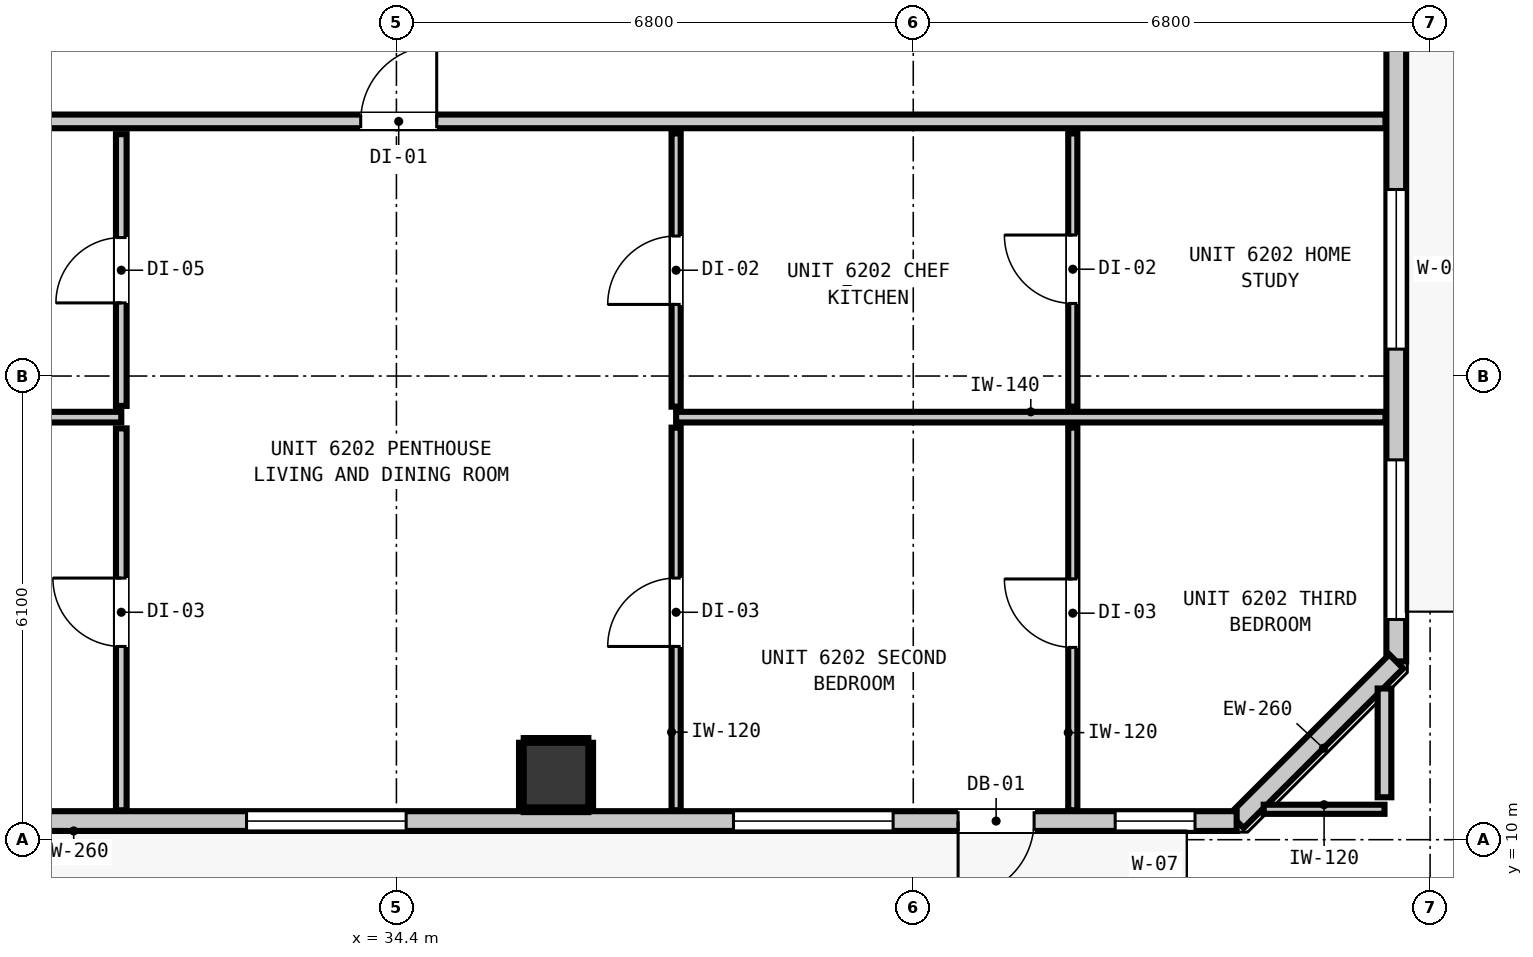
"""IFC4 building model, lengths in metres.
Left out: names, types, materials, properties, quantities, classifications, styles, units other than length and angle.
Written with IfcOpenShell. Run it as: python <this file> out.ifc"""

import sys

from ifc_helpers import new_model, si_unit, direction, frame, frame_2d, origin, origin_2d, place, context, subcontext, project, spatial, rectangle, extrude, element, fill, save


model = new_model("IFC4")
c1 = context("Model", 3, precision=1e-05, world=origin(), true_north=direction((0.0, 1.0)))
c2 = subcontext(c1, "Body", "Model", "MODEL_VIEW")
j1 = project(units=[si_unit("LENGTHUNIT", "METRE"), si_unit("PLANEANGLEUNIT", "RADIAN")], contexts=[c1])
p1 = place(None, origin())
s1 = spatial("IfcSite", under=j1, at=p1, CompositionType="ELEMENT")
p2 = place(p1, origin())
s2 = spatial("IfcBuilding", under=s1, at=p2, CompositionType="ELEMENT")
p3 = place(p2, frame((0.0, 0.0, 213.4)))
s3 = spatial("IfcBuildingStorey", under=s2, at=p3, CompositionType="ELEMENT", Elevation=213.4)
p4 = place(p3, frame((36.5, 10.85, 0.0), z_axis=(0.0, 0.0, 1.0), x_axis=(1.0, 0.0, 0.0)))
e1 = element("IfcColumn", 1, at=p4, inside=s3, PredefinedType="COLUMN", context=c2, shape_type="SweptSolid", body=[
    extrude(rectangle(XDim=0.85, YDim=0.85, at=origin_2d()), origin(), (0.0, 0.0, 1.0), 3.32),
])
p5 = place(p3, frame((47.555, 42.655, 0.0), z_axis=(0.0, 0.0, 1.0), x_axis=(0.0, -1.0, 0.0)))
e2 = element("IfcWall", 2, at=p5, inside=s3, PredefinedType="STANDARD", context=c2, shape_type="SweptSolid", body=[
    extrude(rectangle(XDim=30.31, YDim=0.26, at=frame_2d((15.155, 0.0))), origin(), (0.0, 0.0, 1.0), 3.1),
])
p6 = place(p5, frame((4.082, 0.0, 0.0)))
e3 = element("IfcOpeningElement", 3, at=p6, cuts=e2, PredefinedType="OPENING", context=c2, shape_type="SweptSolid", body=[
    extrude(rectangle(XDim=1.0, YDim=2.15, at=frame_2d((0.5, 1.075))), frame((0.0, 0.14, 0.0), z_axis=(0.0, -1.0, 0.0), x_axis=(1.0, 0.0, 0.0)), (0.0, 0.0, 1.0), 0.28),
])
p7 = place(p5, frame((24.101, 0.0, 0.85)))
e4 = element("IfcOpeningElement", 4, at=p7, cuts=e2, PredefinedType="OPENING", context=c2, shape_type="SweptSolid", body=[
    extrude(rectangle(XDim=2.1, YDim=1.9, at=frame_2d((1.05, 0.95))), frame((0.0, 0.14, 0.0), z_axis=(0.0, -1.0, 0.0), x_axis=(1.0, 0.0, 0.0)), (0.0, 0.0, 1.0), 0.28),
])
p8 = place(p5, frame((27.658, 0.0, 0.85)))
e5 = element("IfcOpeningElement", 5, at=p8, cuts=e2, PredefinedType="OPENING", context=c2, shape_type="SweptSolid", body=[
    extrude(rectangle(XDim=2.1, YDim=1.9, at=frame_2d((1.05, 0.95))), frame((0.0, 0.14, 0.0), z_axis=(0.0, -1.0, 0.0), x_axis=(1.0, 0.0, 0.0)), (0.0, 0.0, 1.0), 0.28),
])
p9 = place(p5, frame((15.255, 0.0, 0.85)))
e6 = element("IfcOpeningElement", 6, at=p9, cuts=e2, PredefinedType="OPENING", context=c2, shape_type="SweptSolid", body=[
    extrude(rectangle(XDim=2.1, YDim=1.9, at=frame_2d((1.05, 0.95))), frame((0.0, 0.14, 0.0), z_axis=(0.0, -1.0, 0.0), x_axis=(1.0, 0.0, 0.0)), (0.0, 0.0, 1.0), 0.28),
])
p10 = place(p3, frame((47.555, 12.345, 0.0), z_axis=(0.0, 0.0, 1.0), x_axis=(-0.707106781187, -0.707106781187, 0.0)))
e7 = element("IfcWall", 7, at=p10, inside=s3, PredefinedType="STANDARD", context=c2, shape_type="SweptSolid", body=[
    extrude(rectangle(XDim=2.97, YDim=0.26, at=frame_2d((1.485, 0.0))), origin(), (0.0, 0.0, 1.0), 3.1),
])
p11 = place(p3, frame((45.455, 10.245, 0.0), z_axis=(0.0, 0.0, 1.0), x_axis=(-1.0, 0.0, 0.0)))
e8 = element("IfcWall", 8, at=p11, inside=s3, PredefinedType="STANDARD", context=c2, shape_type="SweptSolid", body=[
    extrude(rectangle(XDim=32.71, YDim=0.26, at=frame_2d((16.355, 0.0))), origin(), (0.0, 0.0, 1.0), 3.1),
])
p12 = place(p11, frame((2.665, 0.0, 0.0)))
e9 = element("IfcOpeningElement", 9, at=p12, cuts=e8, PredefinedType="OPENING", context=c2, shape_type="SweptSolid", body=[
    extrude(rectangle(XDim=1.0, YDim=2.15, at=frame_2d((0.5, 1.075))), frame((0.0, 0.14, 0.0), z_axis=(0.0, -1.0, 0.0), x_axis=(1.0, 0.0, 0.0)), (0.0, 0.0, 1.0), 0.28),
])
p13 = place(p11, frame((27.297, 0.0, 0.85)))
e10 = element("IfcOpeningElement", 10, at=p13, cuts=e8, PredefinedType="OPENING", context=c2, shape_type="SweptSolid", body=[
    extrude(rectangle(XDim=2.1, YDim=1.9, at=frame_2d((1.05, 0.95))), frame((0.0, 0.14, 0.0), z_axis=(0.0, -1.0, 0.0), x_axis=(1.0, 0.0, 0.0)), (0.0, 0.0, 1.0), 0.28),
])
p14 = place(p11, frame((30.805, 0.0, 0.85)))
e11 = element("IfcOpeningElement", 11, at=p14, cuts=e8, PredefinedType="OPENING", context=c2, shape_type="SweptSolid", body=[
    extrude(rectangle(XDim=0.58, YDim=1.5, at=frame_2d((0.29, 0.75))), frame((0.0, 0.14, 0.0), z_axis=(0.0, -1.0, 0.0), x_axis=(1.0, 0.0, 0.0)), (0.0, 0.0, 1.0), 0.28),
])
p15 = place(p11, frame((21.45, 0.0, 0.85)))
e12 = element("IfcOpeningElement", 12, at=p15, cuts=e8, PredefinedType="OPENING", context=c2, shape_type="SweptSolid", body=[
    extrude(rectangle(XDim=2.1, YDim=1.9, at=frame_2d((1.05, 0.95))), frame((0.0, 0.14, 0.0), z_axis=(0.0, -1.0, 0.0), x_axis=(1.0, 0.0, 0.0)), (0.0, 0.0, 1.0), 0.28),
])
p16 = place(p11, frame((10.927, 0.0, 0.85)))
e13 = element("IfcOpeningElement", 13, at=p16, cuts=e8, PredefinedType="OPENING", context=c2, shape_type="SweptSolid", body=[
    extrude(rectangle(XDim=2.1, YDim=1.9, at=frame_2d((1.05, 0.95))), frame((0.0, 0.14, 0.0), z_axis=(0.0, -1.0, 0.0), x_axis=(1.0, 0.0, 0.0)), (0.0, 0.0, 1.0), 0.28),
])
p17 = place(p11, frame((17.575, 0.0, 0.85)))
e14 = element("IfcOpeningElement", 14, at=p17, cuts=e8, PredefinedType="OPENING", context=c2, shape_type="SweptSolid", body=[
    extrude(rectangle(XDim=2.1, YDim=1.9, at=frame_2d((1.05, 0.95))), frame((0.0, 0.14, 0.0), z_axis=(0.0, -1.0, 0.0), x_axis=(1.0, 0.0, 0.0)), (0.0, 0.0, 1.0), 0.28),
])
p18 = place(p11, frame((4.52, 0.0, 0.85)))
e15 = element("IfcOpeningElement", 15, at=p18, cuts=e8, PredefinedType="OPENING", context=c2, shape_type="SweptSolid", body=[
    extrude(rectangle(XDim=2.1, YDim=1.9, at=frame_2d((1.05, 0.95))), frame((0.0, 0.14, 0.0), z_axis=(0.0, -1.0, 0.0), x_axis=(1.0, 0.0, 0.0)), (0.0, 0.0, 1.0), 0.28),
])
p19 = place(p11, frame((0.548, 0.0, 0.85)))
e16 = element("IfcOpeningElement", 16, at=p19, cuts=e8, PredefinedType="OPENING", context=c2, shape_type="SweptSolid", body=[
    extrude(rectangle(XDim=1.05, YDim=1.65, at=frame_2d((0.525, 0.825))), frame((0.0, 0.14, 0.0), z_axis=(0.0, -1.0, 0.0), x_axis=(1.0, 0.0, 0.0)), (0.0, 0.0, 1.0), 0.28),
])
p20 = place(p3, frame((10.787, 19.45, 0.0), z_axis=(0.0, 0.0, 1.0), x_axis=(1.0, 0.0, 0.0)))
e17 = element("IfcWall", 17, at=p20, inside=s3, PredefinedType="PARTITIONING", context=c2, shape_type="SweptSolid", body=[
    extrude(rectangle(XDim=36.626, YDim=0.18, at=frame_2d((18.313, 0.0))), origin(), (0.0, 0.0, 1.0), 3.1),
])
p21 = place(p20, frame((5.82, 0.0, 0.0)))
e18 = element("IfcOpeningElement", 18, at=p21, cuts=e17, PredefinedType="OPENING", context=c2, shape_type="SweptSolid", body=[
    extrude(rectangle(XDim=1.0, YDim=2.15, at=frame_2d((0.5, 1.075))), frame((0.0, 0.1, 0.0), z_axis=(0.0, -1.0, 0.0), x_axis=(1.0, 0.0, 0.0)), (0.0, 0.0, 1.0), 0.2),
])
p22 = place(p20, frame((23.143, 0.0, 0.0)))
e19 = element("IfcOpeningElement", 19, at=p22, cuts=e17, PredefinedType="OPENING", context=c2, shape_type="SweptSolid", body=[
    extrude(rectangle(XDim=1.0, YDim=2.15, at=frame_2d((0.5, 1.075))), frame((0.0, 0.1, 0.0), z_axis=(0.0, -1.0, 0.0), x_axis=(1.0, 0.0, 0.0)), (0.0, 0.0, 1.0), 0.2),
])
p23 = place(p3, frame((19.22, 15.559, 0.0), z_axis=(0.0, 0.0, 1.0), x_axis=(1.0, 0.0, 0.0)))
e20 = element("IfcWall", 20, at=p23, inside=s3, PredefinedType="PARTITIONING", context=c2, shape_type="SweptSolid", body=[
    extrude(rectangle(XDim=11.56, YDim=0.14, at=frame_2d((5.78, 0.0))), origin(), (0.0, 0.0, 1.0), 3.1),
])
p24 = place(p3, frame((38.08, 15.559, 0.0), z_axis=(0.0, 0.0, 1.0), x_axis=(1.0, 0.0, 0.0)))
e21 = element("IfcWall", 21, at=p24, inside=s3, PredefinedType="PARTITIONING", context=c2, shape_type="SweptSolid", body=[
    extrude(rectangle(XDim=9.333, YDim=0.14, at=frame_2d((4.667, 0.0))), origin(), (0.0, 0.0, 1.0), 3.1),
])
p25 = place(p3, frame((45.811, 10.4, 0.0), z_axis=(0.0, 0.0, 1.0), x_axis=(1.0, 0.0, 0.0)))
e22 = element("IfcWall", 22, at=p25, inside=s3, PredefinedType="PARTITIONING", context=c2, shape_type="SweptSolid", body=[
    extrude(rectangle(XDim=1.589, YDim=0.12, at=frame_2d((0.794, 0.0))), origin(), (0.0, 0.0, 1.0), 3.1),
])
p26 = place(p3, frame((47.4, 10.558, 0.0), z_axis=(0.0, 0.0, 1.0), x_axis=(0.0, 1.0, 0.0)))
e23 = element("IfcWall", 23, at=p26, inside=s3, PredefinedType="PARTITIONING", context=c2, shape_type="SweptSolid", body=[
    extrude(rectangle(XDim=1.431, YDim=0.18, at=frame_2d((0.715, 0.0))), origin(), (0.0, 0.0, 1.0), 3.1),
])
p27 = place(p3, frame((30.78, 10.387, 0.0), z_axis=(0.0, 0.0, 1.0), x_axis=(0.0, 1.0, 0.0)))
e24 = element("IfcWall", 24, at=p27, inside=s3, PredefinedType="PARTITIONING", context=c2, shape_type="SweptSolid", body=[
    extrude(rectangle(XDim=5.024, YDim=0.14, at=frame_2d((2.512, 0.0))), origin(), (0.0, 0.0, 1.0), 3.1),
])
p28 = place(p27, frame((2.155, 0.0, 0.0)))
e25 = element("IfcOpeningElement", 25, at=p28, cuts=e24, PredefinedType="OPENING", context=c2, shape_type="SweptSolid", body=[
    extrude(rectangle(XDim=0.9, YDim=2.1, at=frame_2d((0.45, 1.05))), frame((0.0, 0.08, 0.0), z_axis=(0.0, -1.0, 0.0), x_axis=(1.0, 0.0, 0.0)), (0.0, 0.0, 1.0), 0.16),
])
p29 = place(p3, frame((30.78, 15.707, 0.0), z_axis=(0.0, 0.0, 1.0), x_axis=(0.0, 1.0, 0.0)))
e26 = element("IfcWall", 26, at=p29, inside=s3, PredefinedType="PARTITIONING", context=c2, shape_type="SweptSolid", body=[
    extrude(rectangle(XDim=3.575, YDim=0.14, at=frame_2d((1.788, 0.0))), origin(), (0.0, 0.0, 1.0), 3.1),
])
p30 = place(p29, frame((1.355, 0.0, 0.0)))
e27 = element("IfcOpeningElement", 27, at=p30, cuts=e26, PredefinedType="OPENING", context=c2, shape_type="SweptSolid", body=[
    extrude(rectangle(XDim=0.86, YDim=2.02, at=frame_2d((0.43, 1.01))), frame((0.0, 0.08, 0.0), z_axis=(0.0, -1.0, 0.0), x_axis=(1.0, 0.0, 0.0)), (0.0, 0.0, 1.0), 0.16),
])
p31 = place(p3, frame((38.08, 10.387, 0.0), z_axis=(0.0, 0.0, 1.0), x_axis=(0.0, 1.0, 0.0)))
e28 = element("IfcWall", 28, at=p31, inside=s3, PredefinedType="PARTITIONING", context=c2, shape_type="SweptSolid", body=[
    extrude(rectangle(XDim=5.034, YDim=0.12, at=frame_2d((2.517, 0.0))), origin(), (0.0, 0.0, 1.0), 3.1),
])
p32 = place(p31, frame((2.155, 0.0, 0.0)))
e29 = element("IfcOpeningElement", 29, at=p32, cuts=e28, PredefinedType="OPENING", context=c2, shape_type="SweptSolid", body=[
    extrude(rectangle(XDim=0.9, YDim=2.1, at=frame_2d((0.45, 1.05))), frame((0.0, 0.07, 0.0), z_axis=(0.0, -1.0, 0.0), x_axis=(1.0, 0.0, 0.0)), (0.0, 0.0, 1.0), 0.14),
])
p33 = place(p3, frame((38.08, 15.697, 0.0), z_axis=(0.0, 0.0, 1.0), x_axis=(0.0, 1.0, 0.0)))
e30 = element("IfcWall", 30, at=p33, inside=s3, PredefinedType="PARTITIONING", context=c2, shape_type="SweptSolid", body=[
    extrude(rectangle(XDim=3.595, YDim=0.12, at=frame_2d((1.797, 0.0))), origin(), (0.0, 0.0, 1.0), 3.1),
])
p34 = place(p33, frame((1.345, 0.0, 0.0)))
e31 = element("IfcOpeningElement", 31, at=p34, cuts=e30, PredefinedType="OPENING", context=c2, shape_type="SweptSolid", body=[
    extrude(rectangle(XDim=0.9, YDim=2.1, at=frame_2d((0.45, 1.05))), frame((0.0, 0.07, 0.0), z_axis=(0.0, -1.0, 0.0), x_axis=(1.0, 0.0, 0.0)), (0.0, 0.0, 1.0), 0.14),
])
p35 = place(p3, frame((43.299, 10.387, 0.0), z_axis=(0.0, 0.0, 1.0), x_axis=(0.0, 1.0, 0.0)))
e32 = element("IfcWall", 32, at=p35, inside=s3, PredefinedType="PARTITIONING", context=c2, shape_type="SweptSolid", body=[
    extrude(rectangle(XDim=5.034, YDim=0.12, at=frame_2d((2.517, 0.0))), origin(), (0.0, 0.0, 1.0), 3.1),
])
p36 = place(p35, frame((2.143, 0.0, 0.0)))
e33 = element("IfcOpeningElement", 33, at=p36, cuts=e32, PredefinedType="OPENING", context=c2, shape_type="SweptSolid", body=[
    extrude(rectangle(XDim=0.9, YDim=2.1, at=frame_2d((0.45, 1.05))), frame((0.0, 0.07, 0.0), z_axis=(0.0, -1.0, 0.0), x_axis=(1.0, 0.0, 0.0)), (0.0, 0.0, 1.0), 0.14),
])
p37 = place(p3, frame((43.299, 15.697, 0.0), z_axis=(0.0, 0.0, 1.0), x_axis=(0.0, 1.0, 0.0)))
e34 = element("IfcWall", 34, at=p37, inside=s3, PredefinedType="PARTITIONING", context=c2, shape_type="SweptSolid", body=[
    extrude(rectangle(XDim=3.595, YDim=0.12, at=frame_2d((1.797, 0.0))), origin(), (0.0, 0.0, 1.0), 3.1),
])
p38 = place(p37, frame((1.358, 0.0, 0.0)))
e35 = element("IfcOpeningElement", 35, at=p38, cuts=e34, PredefinedType="OPENING", context=c2, shape_type="SweptSolid", body=[
    extrude(rectangle(XDim=0.9, YDim=2.1, at=frame_2d((0.45, 1.05))), frame((0.0, 0.07, 0.0), z_axis=(0.0, -1.0, 0.0), x_axis=(1.0, 0.0, 0.0)), (0.0, 0.0, 1.0), 0.14),
])
for number, where, z_axis, x_axis in (
    (36, (36.075, 10.393, 0.0), (0.0, 0.0, 1.0), (1.0, 0.0, 0.0)),
    (37, (36.075, 11.307, 0.0), (0.0, 0.0, 1.0), (1.0, 0.0, 0.0)),
):
    element("IfcWall", number, at=place(p3, frame(where, z_axis=z_axis, x_axis=x_axis)), inside=s3, PredefinedType="PARTITIONING", context=c2, shape_type="SweptSolid", body=[
        extrude(rectangle(XDim=0.85, YDim=0.06, at=frame_2d((0.425, 0.0))), origin(), (0.0, 0.0, 1.0), 1.45),
    ])
for number, where, z_axis, x_axis in (
    (38, (36.043, 10.425, 0.0), (0.0, 0.0, 1.0), (0.0, 1.0, 0.0)),
    (39, (36.957, 10.425, 0.0), (0.0, 0.0, 1.0), (0.0, 1.0, 0.0)),
):
    element("IfcWall", number, at=place(p3, frame(where, z_axis=z_axis, x_axis=x_axis)), inside=s3, PredefinedType="PARTITIONING", context=c2, shape_type="SweptSolid", body=[
        extrude(rectangle(XDim=0.85, YDim=0.06, at=frame_2d((0.425, 0.0))), origin(), (0.0, 0.0, 1.0), 1.45),
    ])
p39 = place(p12, origin())
e40 = element("IfcDoor", 40, at=p39, inside=s3, OperationType="SINGLE_SWING_RIGHT", PredefinedType="DOOR", context=c2, shape_type="SweptSolid", body=[
    extrude(rectangle(XDim=1.0, YDim=2.15, at=frame_2d((0.5, 1.075))), frame((0.0, 0.025, 0.0), z_axis=(0.0, -1.0, 0.0), x_axis=(1.0, 0.0, 0.0)), (0.0, 0.0, 1.0), 0.05),
])
fill(e9, e40)
p40 = place(p7, origin())
e41 = element("IfcWindow", 41, at=p40, inside=s3, PartitioningType="SINGLE_PANEL", PredefinedType="WINDOW", context=c2, shape_type="SweptSolid", body=[
    extrude(rectangle(XDim=2.1, YDim=1.9, at=frame_2d((1.05, 0.95))), frame((0.0, 0.03, 0.0), z_axis=(0.0, -1.0, 0.0), x_axis=(1.0, 0.0, 0.0)), (0.0, 0.0, 1.0), 0.06),
])
fill(e4, e41)
p41 = place(p8, origin())
e42 = element("IfcWindow", 42, at=p41, inside=s3, PartitioningType="SINGLE_PANEL", PredefinedType="WINDOW", context=c2, shape_type="SweptSolid", body=[
    extrude(rectangle(XDim=2.1, YDim=1.9, at=frame_2d((1.05, 0.95))), frame((0.0, 0.03, 0.0), z_axis=(0.0, -1.0, 0.0), x_axis=(1.0, 0.0, 0.0)), (0.0, 0.0, 1.0), 0.06),
])
fill(e5, e42)
p42 = place(p16, origin())
e43 = element("IfcWindow", 43, at=p42, inside=s3, PartitioningType="SINGLE_PANEL", PredefinedType="WINDOW", context=c2, shape_type="SweptSolid", body=[
    extrude(rectangle(XDim=2.1, YDim=1.9, at=frame_2d((1.05, 0.95))), frame((0.0, 0.03, 0.0), z_axis=(0.0, -1.0, 0.0), x_axis=(1.0, 0.0, 0.0)), (0.0, 0.0, 1.0), 0.06),
])
fill(e13, e43)
p43 = place(p18, origin())
e44 = element("IfcWindow", 44, at=p43, inside=s3, PartitioningType="SINGLE_PANEL", PredefinedType="WINDOW", context=c2, shape_type="SweptSolid", body=[
    extrude(rectangle(XDim=2.1, YDim=1.9, at=frame_2d((1.05, 0.95))), frame((0.0, 0.03, 0.0), z_axis=(0.0, -1.0, 0.0), x_axis=(1.0, 0.0, 0.0)), (0.0, 0.0, 1.0), 0.06),
])
fill(e15, e44)
p44 = place(p19, origin())
e45 = element("IfcWindow", 45, at=p44, inside=s3, PartitioningType="SINGLE_PANEL", PredefinedType="WINDOW", context=c2, shape_type="SweptSolid", body=[
    extrude(rectangle(XDim=1.05, YDim=1.65, at=frame_2d((0.525, 0.825))), frame((0.0, 0.03, 0.0), z_axis=(0.0, -1.0, 0.0), x_axis=(1.0, 0.0, 0.0)), (0.0, 0.0, 1.0), 0.06),
])
fill(e16, e45)
p45 = place(p22, origin())
e46 = element("IfcDoor", 46, at=p45, inside=s3, OperationType="SINGLE_SWING_RIGHT", PredefinedType="DOOR", context=c2, shape_type="SweptSolid", body=[
    extrude(rectangle(XDim=1.0, YDim=2.15, at=frame_2d((0.5, 1.075))), frame((0.0, 0.025, 0.0), z_axis=(0.0, -1.0, 0.0), x_axis=(1.0, 0.0, 0.0)), (0.0, 0.0, 1.0), 0.05),
])
fill(e19, e46)
p46 = place(p30, origin())
e47 = element("IfcDoor", 47, at=p46, inside=s3, OperationType="SINGLE_SWING_LEFT", PredefinedType="DOOR", context=c2, shape_type="SweptSolid", body=[
    extrude(rectangle(XDim=0.86, YDim=2.02, at=frame_2d((0.43, 1.01))), frame((0.0, 0.025, 0.0), z_axis=(0.0, -1.0, 0.0), x_axis=(1.0, 0.0, 0.0)), (0.0, 0.0, 1.0), 0.05),
])
fill(e27, e47)
p47 = place(p28, origin())
e48 = element("IfcDoor", 48, at=p47, inside=s3, OperationType="SINGLE_SWING_RIGHT", PredefinedType="DOOR", context=c2, shape_type="SweptSolid", body=[
    extrude(rectangle(XDim=0.9, YDim=2.1, at=frame_2d((0.45, 1.05))), frame((0.0, 0.025, 0.0), z_axis=(0.0, -1.0, 0.0), x_axis=(1.0, 0.0, 0.0)), (0.0, 0.0, 1.0), 0.05),
])
fill(e25, e48)
p48 = place(p34, origin())
e49 = element("IfcDoor", 49, at=p48, inside=s3, OperationType="SINGLE_SWING_LEFT", PredefinedType="DOOR", context=c2, shape_type="SweptSolid", body=[
    extrude(rectangle(XDim=0.9, YDim=2.1, at=frame_2d((0.45, 1.05))), frame((0.0, 0.025, 0.0), z_axis=(0.0, -1.0, 0.0), x_axis=(1.0, 0.0, 0.0)), (0.0, 0.0, 1.0), 0.05),
])
fill(e31, e49)
p49 = place(p38, origin())
e50 = element("IfcDoor", 50, at=p49, inside=s3, OperationType="SINGLE_SWING_RIGHT", PredefinedType="DOOR", context=c2, shape_type="SweptSolid", body=[
    extrude(rectangle(XDim=0.9, YDim=2.1, at=frame_2d((0.45, 1.05))), frame((0.0, 0.025, 0.0), z_axis=(0.0, -1.0, 0.0), x_axis=(1.0, 0.0, 0.0)), (0.0, 0.0, 1.0), 0.05),
])
fill(e35, e50)
p50 = place(p32, origin())
e51 = element("IfcDoor", 51, at=p50, inside=s3, OperationType="SINGLE_SWING_LEFT", PredefinedType="DOOR", context=c2, shape_type="SweptSolid", body=[
    extrude(rectangle(XDim=0.9, YDim=2.1, at=frame_2d((0.45, 1.05))), frame((0.0, 0.025, 0.0), z_axis=(0.0, -1.0, 0.0), x_axis=(1.0, 0.0, 0.0)), (0.0, 0.0, 1.0), 0.05),
])
fill(e29, e51)
p51 = place(p36, origin())
e52 = element("IfcDoor", 52, at=p51, inside=s3, OperationType="SINGLE_SWING_RIGHT", PredefinedType="DOOR", context=c2, shape_type="SweptSolid", body=[
    extrude(rectangle(XDim=0.9, YDim=2.1, at=frame_2d((0.45, 1.05))), frame((0.0, 0.025, 0.0), z_axis=(0.0, -1.0, 0.0), x_axis=(1.0, 0.0, 0.0)), (0.0, 0.0, 1.0), 0.05),
])
fill(e33, e52)
save(model, sys.argv[1])
